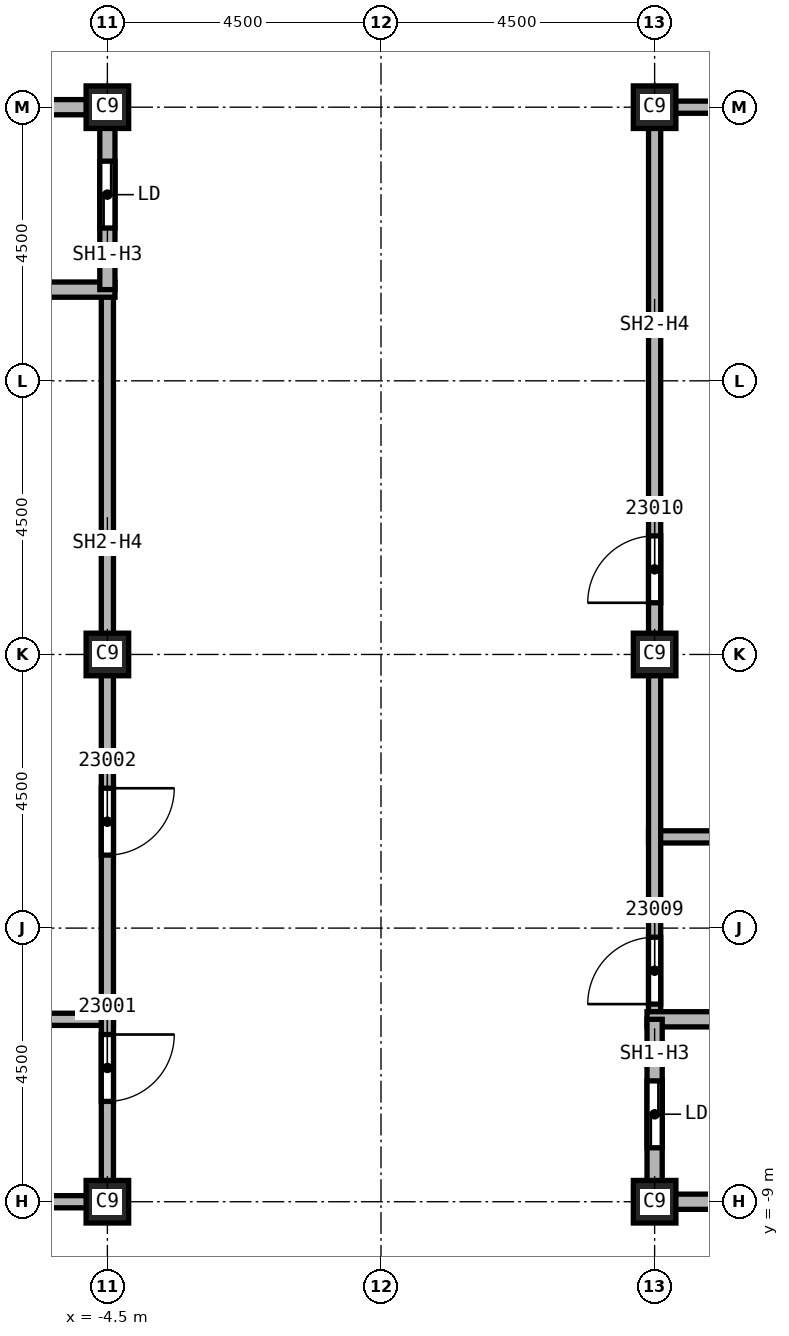
"""IFC4 building model, lengths in metres.
Left out: names, types, materials, properties, quantities, classifications, styles, units other than length and angle.
Written with IfcOpenShell. Run it as: python <this file> out.ifc"""

import sys

from ifc_helpers import new_model, si_unit, direction, frame, frame_2d, origin, origin_2d, place, context, subcontext, project, spatial, rectangle, extrude, element, fill, save


model = new_model("IFC4")
c1 = context("Model", 3, precision=1e-05, world=origin(), true_north=direction((0.0, 1.0)))
c2 = subcontext(c1, "Body", "Model", "MODEL_VIEW")
j1 = project(units=[si_unit("LENGTHUNIT", "METRE"), si_unit("PLANEANGLEUNIT", "RADIAN")], contexts=[c1])
p1 = place(None, origin())
s1 = spatial("IfcSite", under=j1, at=p1, CompositionType="ELEMENT")
p2 = place(p1, origin())
s2 = spatial("IfcBuilding", under=s1, at=p2, CompositionType="ELEMENT")
p3 = place(p2, frame((0.0, 0.0, 326.0)))
s3 = spatial("IfcBuildingStorey", under=s2, at=p3, CompositionType="ELEMENT", Elevation=326.0)
for number, where, z_axis, x_axis in (
    (1, (4.5, 0.0, 0.0), (0.0, 0.0, 1.0), (1.0, 0.0, 0.0)),
    (2, (4.5, 9.0, 0.0), (0.0, 0.0, 1.0), (1.0, 0.0, 0.0)),
    (3, (4.5, -9.0, 0.0), (0.0, 0.0, 1.0), (1.0, 0.0, 0.0)),
    (4, (-4.5, 0.0, 0.0), (0.0, 0.0, 1.0), (1.0, 0.0, 0.0)),
    (5, (-4.5, 9.0, 0.0), (0.0, 0.0, 1.0), (1.0, 0.0, 0.0)),
    (6, (-4.5, -9.0, 0.0), (0.0, 0.0, 1.0), (1.0, 0.0, 0.0)),
):
    element("IfcColumn", number, at=place(p3, frame(where, z_axis=z_axis, x_axis=x_axis)), inside=s3, PredefinedType="COLUMN", context=c2, shape_type="SweptSolid", body=[
        extrude(rectangle(XDim=0.7, YDim=0.7, at=origin_2d()), origin(), (0.0, 0.0, 1.0), 3.74),
    ])
p4 = place(p3, frame((-7.6, -6.0, 0.0), z_axis=(0.0, 0.0, 1.0), x_axis=(1.0, 0.0, 0.0)))
e7 = element("IfcWall", 7, at=p4, inside=s3, PredefinedType="SOLIDWALL", context=c2, shape_type="SweptSolid", body=[
    extrude(rectangle(XDim=3.2, YDim=0.2, at=frame_2d((1.6, 0.0))), origin(), (0.0, 0.0, 1.0), 3.74),
])
p5 = place(p3, frame((-4.5, -9.0, 0.0), z_axis=(0.0, 0.0, 1.0), x_axis=(-1.0, 0.0, 0.0)))
e8 = element("IfcWall", 8, at=p5, inside=s3, PredefinedType="SOLIDWALL", context=c2, shape_type="SweptSolid", body=[
    extrude(rectangle(XDim=3.0, YDim=0.2, at=frame_2d((1.5, 0.0))), origin(), (0.0, 0.0, 1.0), 3.062),
])
p6 = place(p3, frame((-4.5, 6.0, 0.0), z_axis=(0.0, 0.0, 1.0), x_axis=(0.0, -1.0, 0.0)))
e9 = element("IfcWall", 9, at=p6, inside=s3, PredefinedType="SOLIDWALL", context=c2, shape_type="SweptSolid", body=[
    extrude(rectangle(XDim=15.1, YDim=0.2, at=frame_2d((7.55, 0.0))), origin(), (0.0, 0.0, 1.0), 3.062),
])
p7 = place(p6, frame((12.25, 0.0, 0.0)))
e10 = element("IfcOpeningElement", 10, at=p7, cuts=e9, PredefinedType="OPENING", context=c2, shape_type="SweptSolid", body=[
    extrude(rectangle(XDim=1.1, YDim=2.1, at=frame_2d((0.55, 1.05))), frame((0.0, 0.1, 0.0), z_axis=(0.0, -1.0, 0.0), x_axis=(1.0, 0.0, 0.0)), (0.0, 0.0, 1.0), 0.2),
])
p8 = place(p6, frame((8.2, 0.0, 0.0)))
e11 = element("IfcOpeningElement", 11, at=p8, cuts=e9, PredefinedType="OPENING", context=c2, shape_type="SweptSolid", body=[
    extrude(rectangle(XDim=1.1, YDim=2.1, at=frame_2d((0.55, 1.05))), frame((0.0, 0.1, 0.0), z_axis=(0.0, -1.0, 0.0), x_axis=(1.0, 0.0, 0.0)), (0.0, 0.0, 1.0), 0.2),
])
p9 = place(p3, frame((4.4, -3.0, 0.0), z_axis=(0.0, 0.0, 1.0), x_axis=(1.0, 0.0, 0.0)))
e12 = element("IfcWall", 12, at=p9, inside=s3, PredefinedType="SOLIDWALL", context=c2, shape_type="SweptSolid", body=[
    extrude(rectangle(XDim=3.225, YDim=0.2, at=frame_2d((1.613, 0.0))), origin(), (0.0, 0.0, 1.0), 3.74),
])
p10 = place(p3, frame((4.5, -6.0, 0.0), z_axis=(0.0, 0.0, 1.0), x_axis=(0.0, 1.0, 0.0)))
e13 = element("IfcWall", 13, at=p10, inside=s3, PredefinedType="SOLIDWALL", context=c2, shape_type="SweptSolid", body=[
    extrude(rectangle(XDim=15.1, YDim=0.2, at=frame_2d((7.55, 0.0))), origin(), (0.0, 0.0, 1.0), 3.062),
])
p11 = place(p10, frame((0.25, 0.0, 0.0)))
e14 = element("IfcOpeningElement", 14, at=p11, cuts=e13, PredefinedType="OPENING", context=c2, shape_type="SweptSolid", body=[
    extrude(rectangle(XDim=1.1, YDim=2.1, at=frame_2d((0.55, 1.05))), frame((0.0, 0.1, 0.0), z_axis=(0.0, -1.0, 0.0), x_axis=(1.0, 0.0, 0.0)), (0.0, 0.0, 1.0), 0.2),
])
p12 = place(p10, frame((6.85, 0.0, 0.0)))
e15 = element("IfcOpeningElement", 15, at=p12, cuts=e13, PredefinedType="OPENING", context=c2, shape_type="SweptSolid", body=[
    extrude(rectangle(XDim=1.1, YDim=2.1, at=frame_2d((0.55, 1.05))), frame((0.0, 0.1, 0.0), z_axis=(0.0, -1.0, 0.0), x_axis=(1.0, 0.0, 0.0)), (0.0, 0.0, 1.0), 0.2),
])
p13 = place(p3, frame((4.5, 9.0, 0.0), z_axis=(0.0, 0.0, 1.0), x_axis=(1.0, 0.0, 0.0)))
e16 = element("IfcWall", 16, at=p13, inside=s3, PredefinedType="SOLIDWALL", context=c2, shape_type="SweptSolid", body=[
    extrude(rectangle(XDim=3.0, YDim=0.2, at=frame_2d((1.5, 0.0))), origin(), (0.0, 0.0, 1.0), 3.062),
])
p14 = place(p3, frame((-7.625, 6.0, 0.0), z_axis=(0.0, 0.0, 1.0), x_axis=(1.0, 0.0, 0.0)))
e17 = element("IfcWall", 17, at=p14, inside=s3, PredefinedType="SOLIDWALL", context=c2, shape_type="SweptSolid", body=[
    extrude(rectangle(XDim=3.25, YDim=0.25, at=frame_2d((1.625, 0.0))), origin(), (0.0, 0.0, 1.0), 3.74),
])
p15 = place(p3, frame((-7.5, 9.0, 0.0), z_axis=(0.0, 0.0, 1.0), x_axis=(1.0, 0.0, 0.0)))
e18 = element("IfcWall", 18, at=p15, inside=s3, PredefinedType="SOLIDWALL", context=c2, shape_type="SweptSolid", body=[
    extrude(rectangle(XDim=3.0, YDim=0.25, at=frame_2d((1.5, 0.0))), origin(), (0.0, 0.0, 1.0), 3.062),
])
p16 = place(p3, frame((-4.5, 9.125, 0.0), z_axis=(0.0, 0.0, 1.0), x_axis=(0.0, -1.0, 0.0)))
e19 = element("IfcWall", 19, at=p16, inside=s3, PredefinedType="SOLIDWALL", context=c2, shape_type="SweptSolid", body=[
    extrude(rectangle(XDim=3.125, YDim=0.25, at=frame_2d((1.562, 0.0))), origin(), (0.0, 0.0, 1.0), 3.062),
])
p17 = place(p16, frame((1.012, 0.0, 0.0)))
e20 = element("IfcOpeningElement", 20, at=p17, cuts=e19, PredefinedType="OPENING", context=c2, shape_type="SweptSolid", body=[
    extrude(rectangle(XDim=1.1, YDim=2.1, at=frame_2d((0.55, 1.05))), frame((0.0, 0.125, 0.0), z_axis=(0.0, -1.0, 0.0), x_axis=(1.0, 0.0, 0.0)), (0.0, 0.0, 1.0), 0.25),
])
p18 = place(p3, frame((4.375, -6.0, 0.0), z_axis=(0.0, 0.0, 1.0), x_axis=(1.0, 0.0, 0.0)))
e21 = element("IfcWall", 21, at=p18, inside=s3, PredefinedType="SOLIDWALL", context=c2, shape_type="SweptSolid", body=[
    extrude(rectangle(XDim=3.25, YDim=0.25, at=frame_2d((1.625, 0.0))), origin(), (0.0, 0.0, 1.0), 3.74),
])
p19 = place(p3, frame((4.5, -9.125, 0.0), z_axis=(0.0, 0.0, 1.0), x_axis=(0.0, 1.0, 0.0)))
e22 = element("IfcWall", 22, at=p19, inside=s3, PredefinedType="SOLIDWALL", context=c2, shape_type="SweptSolid", body=[
    extrude(rectangle(XDim=3.125, YDim=0.25, at=frame_2d((1.562, 0.0))), origin(), (0.0, 0.0, 1.0), 3.062),
])
p20 = place(p19, frame((1.012, 0.0, 0.0)))
e23 = element("IfcOpeningElement", 23, at=p20, cuts=e22, PredefinedType="OPENING", context=c2, shape_type="SweptSolid", body=[
    extrude(rectangle(XDim=1.1, YDim=2.1, at=frame_2d((0.55, 1.05))), frame((0.0, 0.125, 0.0), z_axis=(0.0, -1.0, 0.0), x_axis=(1.0, 0.0, 0.0)), (0.0, 0.0, 1.0), 0.25),
])
p21 = place(p3, frame((7.5, -9.0, 0.0), z_axis=(0.0, 0.0, 1.0), x_axis=(-1.0, 0.0, 0.0)))
e24 = element("IfcWall", 24, at=p21, inside=s3, PredefinedType="SOLIDWALL", context=c2, shape_type="SweptSolid", body=[
    extrude(rectangle(XDim=3.0, YDim=0.25, at=frame_2d((1.5, 0.0))), origin(), (0.0, 0.0, 1.0), 3.062),
])
p22 = place(p7, origin())
e25 = element("IfcDoor", 25, at=p22, inside=s3, OperationType="SINGLE_SWING_RIGHT", PredefinedType="DOOR", context=c2, shape_type="SweptSolid", body=[
    extrude(rectangle(XDim=1.1, YDim=2.1, at=frame_2d((0.55, 1.05))), frame((0.0, 0.025, 0.0), z_axis=(0.0, -1.0, 0.0), x_axis=(1.0, 0.0, 0.0)), (0.0, 0.0, 1.0), 0.05),
])
fill(e10, e25)
p23 = place(p8, origin())
e26 = element("IfcDoor", 26, at=p23, inside=s3, OperationType="SINGLE_SWING_LEFT", PredefinedType="DOOR", context=c2, shape_type="SweptSolid", body=[
    extrude(rectangle(XDim=1.1, YDim=2.1, at=frame_2d((0.55, 1.05))), frame((0.0, 0.025, 0.0), z_axis=(0.0, -1.0, 0.0), x_axis=(1.0, 0.0, 0.0)), (0.0, 0.0, 1.0), 0.05),
])
fill(e11, e26)
p24 = place(p11, origin())
e27 = element("IfcDoor", 27, at=p24, inside=s3, OperationType="SINGLE_SWING_RIGHT", PredefinedType="DOOR", context=c2, shape_type="SweptSolid", body=[
    extrude(rectangle(XDim=1.1, YDim=2.1, at=frame_2d((0.55, 1.05))), frame((0.0, 0.025, 0.0), z_axis=(0.0, -1.0, 0.0), x_axis=(1.0, 0.0, 0.0)), (0.0, 0.0, 1.0), 0.05),
])
fill(e14, e27)
p25 = place(p12, origin())
e28 = element("IfcDoor", 28, at=p25, inside=s3, OperationType="SINGLE_SWING_LEFT", PredefinedType="DOOR", context=c2, shape_type="SweptSolid", body=[
    extrude(rectangle(XDim=1.1, YDim=2.1, at=frame_2d((0.55, 1.05))), frame((0.0, 0.025, 0.0), z_axis=(0.0, -1.0, 0.0), x_axis=(1.0, 0.0, 0.0)), (0.0, 0.0, 1.0), 0.05),
])
fill(e15, e28)
p26 = place(p17, origin())
e29 = element("IfcDoor", 29, at=p26, inside=s3, OperationType="SLIDING_TO_LEFT", PredefinedType="DOOR", context=c2, shape_type="SweptSolid", body=[
    extrude(rectangle(XDim=1.1, YDim=2.1, at=frame_2d((0.55, 1.05))), frame((0.0, 0.025, 0.0), z_axis=(0.0, -1.0, 0.0), x_axis=(1.0, 0.0, 0.0)), (0.0, 0.0, 1.0), 0.05),
])
fill(e20, e29)
p27 = place(p20, origin())
e30 = element("IfcDoor", 30, at=p27, inside=s3, OperationType="SLIDING_TO_LEFT", PredefinedType="DOOR", context=c2, shape_type="SweptSolid", body=[
    extrude(rectangle(XDim=1.1, YDim=2.1, at=frame_2d((0.55, 1.05))), frame((0.0, 0.025, 0.0), z_axis=(0.0, -1.0, 0.0), x_axis=(1.0, 0.0, 0.0)), (0.0, 0.0, 1.0), 0.05),
])
fill(e23, e30)
save(model, sys.argv[1])
